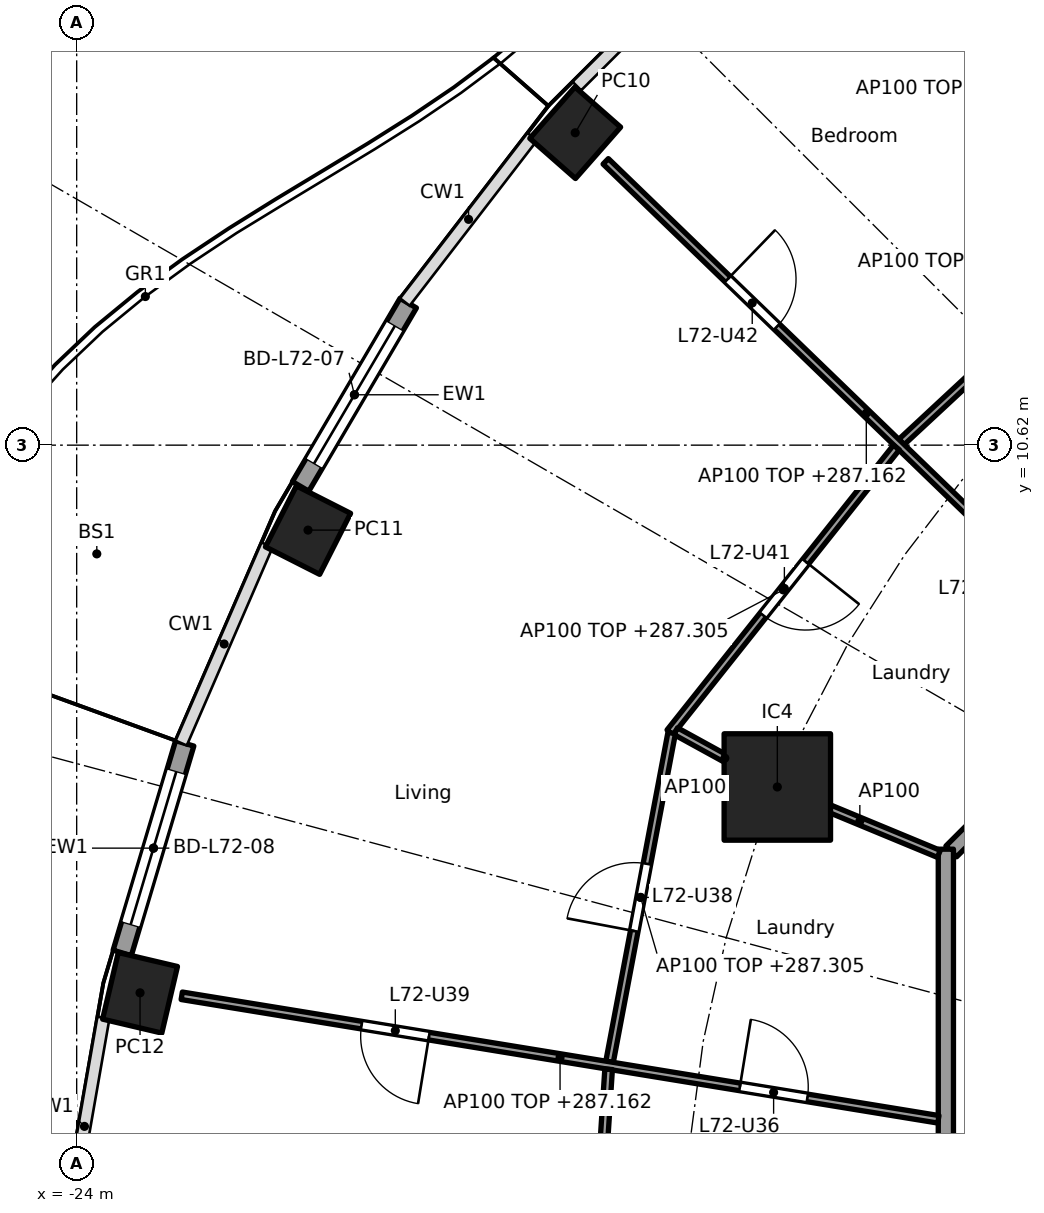
"""IFC4 building model, lengths in metres.
Left out: names, types, materials, properties, quantities, classifications, styles, units other than length and angle.
Written with IfcOpenShell. Run it as: python <this file> out.ifc"""

import sys

from ifc_helpers import new_model, si_unit, direction, frame, frame_2d, origin, origin_2d, place, context, subcontext, project, spatial, rectangle, hollow_rectangle, extrude, element, fill, save


model = new_model("IFC4")
c1 = context("Model", 3, precision=1e-05, world=origin(), true_north=direction((0.0, 1.0)))
c2 = subcontext(c1, "Body", "Model", "MODEL_VIEW")
j1 = project(units=[si_unit("LENGTHUNIT", "METRE"), si_unit("PLANEANGLEUNIT", "RADIAN")], contexts=[c1])
p1 = place(None, origin())
s1 = spatial("IfcSite", under=j1, at=p1, CompositionType="ELEMENT")
p2 = place(p1, origin())
s2 = spatial("IfcBuilding", under=s1, at=p2, CompositionType="ELEMENT")
p3 = place(p2, frame((0.0, 0.0, 284.4)))
s3 = spatial("IfcBuildingStorey", under=s2, at=p3, CompositionType="ELEMENT", Elevation=284.4)
for number, where, z_axis, x_axis in (
    (1, (-17.441, 14.73, 0.0), (0.0, 0.0, 1.0), (-0.66, -0.751, 0.0)),
    (2, (-20.957, 9.502, 0.0), (0.0, 0.0, 1.0), (-0.452, -0.892, 0.0)),
    (3, (-23.166, 3.415, 0.0), (0.0, 0.0, 1.0), (-0.229, -0.973, 0.0)),
):
    element("IfcColumn", number, at=place(p3, frame(where, z_axis=z_axis, x_axis=x_axis)), inside=s3, PredefinedType="COLUMN", context=c2, shape_type="SweptSolid", body=[
        extrude(hollow_rectangle(XDim=0.9, YDim=0.8, WallThickness=0.028, at=origin_2d()), origin(), (0.0, 0.0, 1.0), 3.7),
    ])
p4 = place(p3, frame((-14.782, 6.123, 0.0), z_axis=(0.0, 0.0, 1.0), x_axis=(1.0, 0.0, 0.0)))
e4 = element("IfcColumn", 4, at=p4, inside=s3, PredefinedType="COLUMN", context=c2, shape_type="SweptSolid", body=[
    extrude(rectangle(XDim=1.4, YDim=1.4, at=origin_2d()), origin(), (0.0, 0.0, 1.0), 3.7),
])
p5 = place(p3, frame((-21.054, 10.077, 0.0), z_axis=(0.0, 0.0, 1.0), x_axis=(0.506371364425, 0.862315511452, 0.0)))
e5 = element("IfcWall", 5, at=p5, inside=s3, PredefinedType="SOLIDWALL", context=c2, shape_type="SweptSolid", body=[
    extrude(rectangle(XDim=2.796, YDim=0.25, at=frame_2d((1.398, 0.0))), origin(), (0.0, 0.0, 1.0), 3.44),
])
p6 = place(p5, frame((0.348, 0.0, 0.0)))
e6 = element("IfcOpeningElement", 6, at=p6, cuts=e5, PredefinedType="OPENING", context=c2, shape_type="SweptSolid", body=[
    extrude(rectangle(XDim=2.1, YDim=2.4, at=frame_2d((1.05, 1.2))), frame((0.0, 0.135, 0.0), z_axis=(0.0, -1.0, 0.0), x_axis=(1.0, 0.0, 0.0)), (0.0, 0.0, 1.0), 0.27),
])
p7 = place(p3, frame((-23.401, 3.94, 0.0), z_axis=(0.0, 0.0, 1.0), x_axis=(0.285876209024, 0.9582665564, 0.0)))
e7 = element("IfcWall", 7, at=p7, inside=s3, PredefinedType="SOLIDWALL", context=c2, shape_type="SweptSolid", body=[
    extrude(rectangle(XDim=2.877, YDim=0.25, at=frame_2d((1.438, 0.0))), origin(), (0.0, 0.0, 1.0), 3.44),
])
p8 = place(p7, frame((0.389, 0.0, 0.0)))
e8 = element("IfcOpeningElement", 8, at=p8, cuts=e7, PredefinedType="OPENING", context=c2, shape_type="SweptSolid", body=[
    extrude(rectangle(XDim=2.1, YDim=2.4, at=frame_2d((1.05, 1.2))), frame((0.0, 0.135, 0.0), z_axis=(0.0, -1.0, 0.0), x_axis=(1.0, 0.0, 0.0)), (0.0, 0.0, 1.0), 0.27),
])
p9 = place(p3, frame((-5.275, 12.494, 0.0), z_axis=(0.0, 0.0, 1.0), x_axis=(-0.707106781187, -0.707106781187, 0.0)))
e9 = element("IfcWall", 9, at=p9, inside=s3, PredefinedType="PARTITIONING", context=c2, shape_type="SweptSolid", body=[
    extrude(rectangle(XDim=10.209, YDim=0.2, at=frame_2d((5.104, 0.0))), origin(), (0.0, 0.0, 1.0), 3.44),
])
p10 = place(p3, frame((-12.565, 5.304, 0.0), z_axis=(0.0, 0.0, 1.0), x_axis=(0.0, -1.0, 0.0)))
e10 = element("IfcWall", 10, at=p10, inside=s3, PredefinedType="PARTITIONING", context=c2, shape_type="SweptSolid", body=[
    extrude(rectangle(XDim=10.409, YDim=0.2, at=frame_2d((5.205, 0.0))), origin(), (0.0, 0.0, 1.0), 3.44),
])
p11 = place(p10, frame((4.804, 0.0, 0.0)))
e11 = element("IfcOpeningElement", 11, at=p11, cuts=e10, PredefinedType="OPENING", context=c2, shape_type="SweptSolid", body=[
    extrude(rectangle(XDim=1.0, YDim=2.1, at=frame_2d((0.5, 1.05))), frame((0.0, 0.11, 0.0), z_axis=(0.0, -1.0, 0.0), x_axis=(1.0, 0.0, 0.0)), (0.0, 0.0, 1.0), 0.22),
])
p12 = place(p3, frame((-9.813, 13.693, 0.0), z_axis=(0.0, 0.0, 1.0), x_axis=(-0.515509511815, 0.856883856324, 0.0)))
e12 = element("IfcWall", 12, at=p12, inside=s3, PredefinedType="PARTITIONING", context=c2, shape_type="SweptSolid", body=[
    extrude(rectangle(XDim=5.346, YDim=0.1, at=frame_2d((2.673, 0.0))), origin(), (0.0, 0.0, 1.0), 2.905),
])
p13 = place(p3, frame((-9.875, 13.702, 0.0), z_axis=(0.0, 0.0, 1.0), x_axis=(-0.732618266441, -0.680639754699, 0.0)))
e13 = element("IfcWall", 13, at=p13, inside=s3, PredefinedType="PARTITIONING", context=c2, shape_type="SweptSolid", body=[
    extrude(rectangle(XDim=4.467, YDim=0.1, at=frame_2d((2.233, 0.0))), origin(), (0.0, 0.0, 1.0), 2.905),
])
p14 = place(p3, frame((-10.183, 7.727, 0.0), z_axis=(0.0, 0.0, 1.0), x_axis=(-0.719063433856, 0.694944442449, 0.0)))
e14 = element("IfcWall", 14, at=p14, inside=s3, PredefinedType="PARTITIONING", context=c2, shape_type="SweptSolid", body=[
    extrude(rectangle(XDim=9.535, YDim=0.1, at=frame_2d((4.768, 0.0))), origin(), (0.0, 0.0, 1.0), 2.762),
])
p15 = place(p14, frame((6.405, 0.0, 0.0)))
e15 = element("IfcOpeningElement", 15, at=p15, cuts=e14, PredefinedType="OPENING", context=c2, shape_type="SweptSolid", body=[
    extrude(rectangle(XDim=0.9, YDim=2.1, at=frame_2d((0.45, 1.05))), frame((0.0, 0.06, 0.0), z_axis=(0.0, -1.0, 0.0), x_axis=(1.0, 0.0, 0.0)), (0.0, 0.0, 1.0), 0.12),
])
p16 = place(p14, frame((1.637, 0.0, 0.0)))
e16 = element("IfcOpeningElement", 16, at=p16, cuts=e14, PredefinedType="OPENING", context=c2, shape_type="SweptSolid", body=[
    extrude(rectangle(XDim=0.9, YDim=2.1, at=frame_2d((0.45, 1.05))), frame((0.0, 0.06, 0.0), z_axis=(0.0, -1.0, 0.0), x_axis=(1.0, 0.0, 0.0)), (0.0, 0.0, 1.0), 0.12),
])
p17 = place(p3, frame((-13.216, 10.589, 0.0), z_axis=(0.0, 0.0, 1.0), x_axis=(-0.622272178674, -0.782800955319, 0.0)))
e17 = element("IfcWall", 17, at=p17, inside=s3, PredefinedType="PARTITIONING", context=c2, shape_type="SweptSolid", body=[
    extrude(rectangle(XDim=4.786, YDim=0.1, at=frame_2d((2.393, 0.0))), origin(), (0.0, 0.0, 1.0), 2.905),
])
p18 = place(p17, frame((1.918, 0.0, 0.0)))
e18 = element("IfcOpeningElement", 18, at=p18, cuts=e17, PredefinedType="OPENING", context=c2, shape_type="SweptSolid", body=[
    extrude(rectangle(XDim=0.9, YDim=2.1, at=frame_2d((0.45, 1.05))), frame((0.0, 0.06, 0.0), z_axis=(0.0, -1.0, 0.0), x_axis=(1.0, 0.0, 0.0)), (0.0, 0.0, 1.0), 0.12),
])
p19 = place(p3, frame((-12.657, 5.243, 0.0), z_axis=(0.0, 0.0, 1.0), x_axis=(-0.923864733477, 0.382719158442, 0.0)))
e19 = element("IfcWall", 19, at=p19, inside=s3, PredefinedType="PARTITIONING", context=c2, shape_type="SweptSolid", body=[
    extrude(rectangle(XDim=2.25, YDim=0.1, at=frame_2d((1.125, 0.0))), origin(), (0.0, 0.0, 1.0), 3.44),
])
p20 = place(p3, frame((-14.826, 6.147, 0.0), z_axis=(0.0, 0.0, 1.0), x_axis=(-0.876411496923, 0.481562963755, 0.0)))
e20 = element("IfcWall", 20, at=p20, inside=s3, PredefinedType="PARTITIONING", context=c2, shape_type="SweptSolid", body=[
    extrude(rectangle(XDim=1.475, YDim=0.1, at=frame_2d((0.738, 0.0))), origin(), (0.0, 0.0, 1.0), 3.44),
])
p21 = place(p3, frame((-16.172, 6.832, 0.0), z_axis=(0.0, 0.0, 1.0), x_axis=(-0.185671645069, -0.982611846162, 0.0)))
e21 = element("IfcWall", 21, at=p21, inside=s3, PredefinedType="PARTITIONING", context=c2, shape_type="SweptSolid", body=[
    extrude(rectangle(XDim=4.401, YDim=0.1, at=frame_2d((2.2, 0.0))), origin(), (0.0, 0.0, 1.0), 2.905),
])
p22 = place(p21, frame((1.75, 0.0, 0.0)))
e22 = element("IfcOpeningElement", 22, at=p22, cuts=e21, PredefinedType="OPENING", context=c2, shape_type="SweptSolid", body=[
    extrude(rectangle(XDim=0.9, YDim=2.1, at=frame_2d((0.45, 1.05))), frame((0.0, 0.06, 0.0), z_axis=(0.0, -1.0, 0.0), x_axis=(1.0, 0.0, 0.0)), (0.0, 0.0, 1.0), 0.12),
])
p23 = place(p3, frame((-12.664, 1.751, 0.0), z_axis=(0.0, 0.0, 1.0), x_axis=(-0.986935394566, 0.161116501183, 0.0)))
e23 = element("IfcWall", 23, at=p23, inside=s3, PredefinedType="PARTITIONING", context=c2, shape_type="SweptSolid", body=[
    extrude(rectangle(XDim=10.086, YDim=0.1, at=frame_2d((5.043, 0.0))), origin(), (0.0, 0.0, 1.0), 2.762),
])
p24 = place(p23, frame((1.746, 0.0, 0.0)))
e24 = element("IfcOpeningElement", 24, at=p24, cuts=e23, PredefinedType="OPENING", context=c2, shape_type="SweptSolid", body=[
    extrude(rectangle(XDim=0.9, YDim=2.1, at=frame_2d((0.45, 1.05))), frame((0.0, 0.06, 0.0), z_axis=(0.0, -1.0, 0.0), x_axis=(1.0, 0.0, 0.0)), (0.0, 0.0, 1.0), 0.12),
])
p25 = place(p23, frame((6.789, 0.0, 0.0)))
e25 = element("IfcOpeningElement", 25, at=p25, cuts=e23, PredefinedType="OPENING", context=c2, shape_type="SweptSolid", body=[
    extrude(rectangle(XDim=0.9, YDim=2.1, at=frame_2d((0.45, 1.05))), frame((0.0, 0.06, 0.0), z_axis=(0.0, -1.0, 0.0), x_axis=(1.0, 0.0, 0.0)), (0.0, 0.0, 1.0), 0.12),
])
p26 = place(p3, frame((-17.002, 2.409, 0.0), z_axis=(0.0, 0.0, 1.0), x_axis=(-0.064855550758, -0.997894662545, 0.0)))
e26 = element("IfcWall", 26, at=p26, inside=s3, PredefinedType="PARTITIONING", context=c2, shape_type="SweptSolid", body=[
    extrude(rectangle(XDim=4.656, YDim=0.1, at=frame_2d((2.328, 0.0))), origin(), (0.0, 0.0, 1.0), 2.905),
])
p27 = place(p6, origin())
e27 = element("IfcDoor", 27, at=p27, inside=s3, OperationType="SLIDING_TO_LEFT", PredefinedType="DOOR", context=c2, shape_type="SweptSolid", body=[
    extrude(rectangle(XDim=2.1, YDim=2.4, at=frame_2d((1.05, 1.2))), frame((0.0, 0.025, 0.0), z_axis=(0.0, -1.0, 0.0), x_axis=(1.0, 0.0, 0.0)), (0.0, 0.0, 1.0), 0.05),
])
fill(e6, e27)
p28 = place(p8, origin())
e28 = element("IfcDoor", 28, at=p28, inside=s3, OperationType="SLIDING_TO_LEFT", PredefinedType="DOOR", context=c2, shape_type="SweptSolid", body=[
    extrude(rectangle(XDim=2.1, YDim=2.4, at=frame_2d((1.05, 1.2))), frame((0.0, 0.025, 0.0), z_axis=(0.0, -1.0, 0.0), x_axis=(1.0, 0.0, 0.0)), (0.0, 0.0, 1.0), 0.05),
])
fill(e8, e28)
p29 = place(p24, frame((0.9, 0.0, 0.0), x_axis=(-1.0, 0.0, 0.0)))
e29 = element("IfcDoor", 29, at=p29, inside=s3, OperationType="SINGLE_SWING_LEFT", PredefinedType="DOOR", context=c2, shape_type="SweptSolid", body=[
    extrude(rectangle(XDim=0.9, YDim=2.1, at=frame_2d((0.45, 1.05))), frame((0.0, 0.025, 0.0), z_axis=(0.0, -1.0, 0.0), x_axis=(1.0, 0.0, 0.0)), (0.0, 0.0, 1.0), 0.05),
])
fill(e24, e29)
p30 = place(p22, frame((0.9, 0.0, 0.0), x_axis=(-1.0, 0.0, 0.0)))
e30 = element("IfcDoor", 30, at=p30, inside=s3, OperationType="SINGLE_SWING_LEFT", PredefinedType="DOOR", context=c2, shape_type="SweptSolid", body=[
    extrude(rectangle(XDim=0.9, YDim=2.1, at=frame_2d((0.45, 1.05))), frame((0.0, 0.025, 0.0), z_axis=(0.0, -1.0, 0.0), x_axis=(1.0, 0.0, 0.0)), (0.0, 0.0, 1.0), 0.05),
])
fill(e22, e30)
p31 = place(p25, origin())
e31 = element("IfcDoor", 31, at=p31, inside=s3, OperationType="SINGLE_SWING_LEFT", PredefinedType="DOOR", context=c2, shape_type="SweptSolid", body=[
    extrude(rectangle(XDim=0.9, YDim=2.1, at=frame_2d((0.45, 1.05))), frame((0.0, 0.025, 0.0), z_axis=(0.0, -1.0, 0.0), x_axis=(1.0, 0.0, 0.0)), (0.0, 0.0, 1.0), 0.05),
])
fill(e25, e31)
p32 = place(p18, origin())
e32 = element("IfcDoor", 32, at=p32, inside=s3, OperationType="SINGLE_SWING_LEFT", PredefinedType="DOOR", context=c2, shape_type="SweptSolid", body=[
    extrude(rectangle(XDim=0.9, YDim=2.1, at=frame_2d((0.45, 1.05))), frame((0.0, 0.025, 0.0), z_axis=(0.0, -1.0, 0.0), x_axis=(1.0, 0.0, 0.0)), (0.0, 0.0, 1.0), 0.05),
])
fill(e18, e32)
p33 = place(p15, frame((0.9, 0.0, 0.0), x_axis=(-1.0, 0.0, 0.0)))
e33 = element("IfcDoor", 33, at=p33, inside=s3, OperationType="SINGLE_SWING_LEFT", PredefinedType="DOOR", context=c2, shape_type="SweptSolid", body=[
    extrude(rectangle(XDim=0.9, YDim=2.1, at=frame_2d((0.45, 1.05))), frame((0.0, 0.025, 0.0), z_axis=(0.0, -1.0, 0.0), x_axis=(1.0, 0.0, 0.0)), (0.0, 0.0, 1.0), 0.05),
])
fill(e15, e33)
save(model, sys.argv[1])
